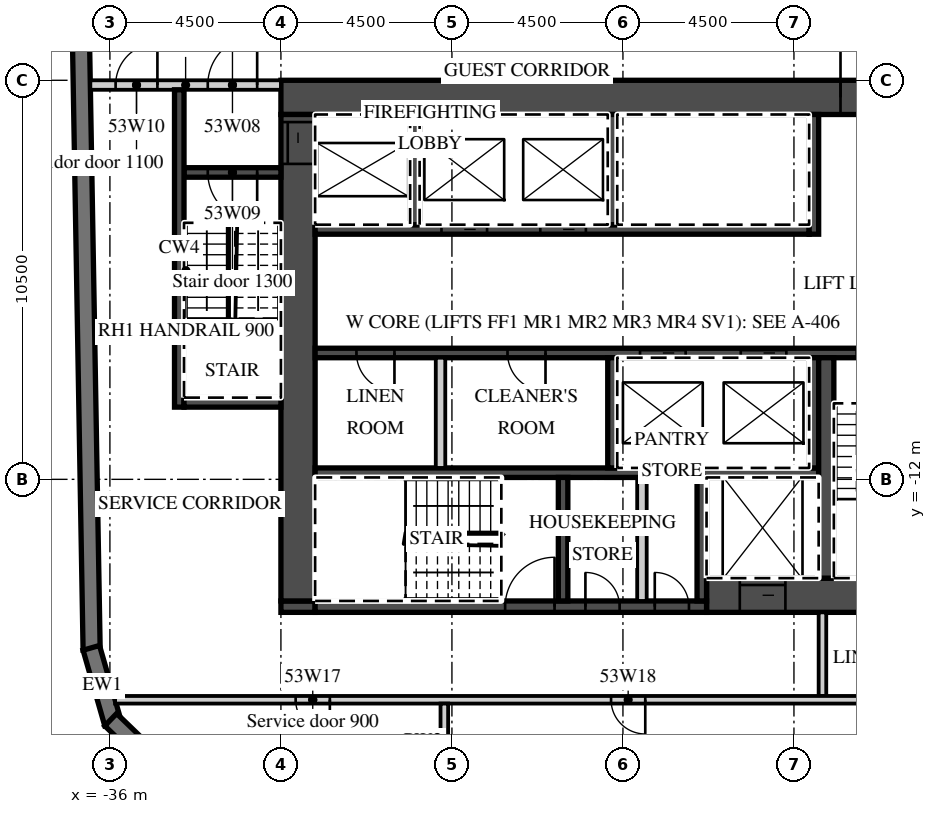
"""IFC4 building model, lengths in metres.
Left out: names, types, materials, properties, quantities, classifications, styles, units other than length and angle.
Written with IfcOpenShell. Run it as: python <this file> out.ifc"""

import sys

from ifc_helpers import new_model, si_unit, direction, frame, frame_2d, origin, place, context, subcontext, project, spatial, polyline, rectangle, outline, extrude, element, fill, save


model = new_model("IFC4")
c1 = context("Model", 3, precision=1e-05, world=origin(), true_north=direction((0.0, 1.0)))
c2 = subcontext(c1, "Body", "Model", "MODEL_VIEW")
j1 = project(units=[si_unit("LENGTHUNIT", "METRE"), si_unit("PLANEANGLEUNIT", "RADIAN")], contexts=[c1])
p1 = place(None, origin())
s1 = spatial("IfcSite", under=j1, at=p1, CompositionType="ELEMENT")
p2 = place(p1, origin())
s2 = spatial("IfcBuilding", under=s1, at=p2, CompositionType="ELEMENT")
p3 = place(p2, frame((0.0, 0.0, 221.0)))
s3 = spatial("IfcBuildingStorey", under=s2, at=p3, CompositionType="ELEMENT", Elevation=221.0)
p4 = place(p3, frame((-37.057, 16.503, 0.0), z_axis=(0.0, 0.0, 1.0), x_axis=(0.017452279857, -0.999847697366, 0.0)))
e1 = element("IfcWall", 1, at=p4, inside=s3, PredefinedType="SOLIDWALL", context=c2, shape_type="SweptSolid", body=[
    extrude(rectangle(XDim=33.0, YDim=0.45, at=frame_2d((16.5, 0.0))), origin(), (0.0, 0.0, 1.0), 3.02),
])
p5 = place(p3, frame((-36.49, -16.434, 0.0), z_axis=(0.0, 0.0, 1.0), x_axis=(0.275577603096, -0.961278827745, 0.0)))
e2 = element("IfcWall", 2, at=p5, inside=s3, PredefinedType="SOLIDWALL", context=c2, shape_type="SweptSolid", body=[
    extrude(outline(polyline([(0.0, -0.225), (2.071, -0.225), (1.95, 0.225), (0.121, 0.225), (0.0, -0.225)])), origin(), (0.0, 0.0, 1.0), 3.02),
])
p6 = place(p3, frame((-35.979, -18.324, 0.0), z_axis=(0.0, 0.0, 1.0), x_axis=(0.719320193998, -0.694678672846, 0.0)))
e3 = element("IfcWall", 3, at=p6, inside=s3, PredefinedType="SOLIDWALL", context=c2, shape_type="SweptSolid", body=[
    extrude(outline(polyline([(0.0, -0.225), (2.071, -0.225), (1.95, 0.225), (0.121, 0.225), (0.0, -0.225)])), origin(), (0.0, 0.0, 1.0), 3.02),
])
p7 = place(p3, frame((-31.5, -1.95, 0.0), z_axis=(0.0, 0.0, 1.0), x_axis=(1.0, 0.0, 0.0)))
e4 = element("IfcWall", 4, at=p7, inside=s3, PredefinedType="SHEAR", context=c2, shape_type="SweptSolid", body=[
    extrude(rectangle(XDim=18.0, YDim=0.9, at=frame_2d((9.0, 0.0))), origin(), (0.0, 0.0, 1.0), 3.02),
])
p8 = place(p7, frame((14.725, 0.0, 0.0)))
e5 = element("IfcOpeningElement", 5, at=p8, cuts=e4, PredefinedType="OPENING", context=c2, shape_type="SweptSolid", body=[
    extrude(rectangle(XDim=1.8, YDim=2.1, at=frame_2d((0.9, 1.05))), frame((0.0, 0.46, 0.0), z_axis=(0.0, -1.0, 0.0), x_axis=(1.0, 0.0, 0.0)), (0.0, 0.0, 1.0), 0.92),
])
p9 = place(p3, frame((-20.3, -15.05, 0.0), z_axis=(0.0, 0.0, 1.0), x_axis=(1.0, 0.0, 0.0)))
e6 = element("IfcWall", 6, at=p9, inside=s3, PredefinedType="SHEAR", context=c2, shape_type="SweptSolid", body=[
    extrude(rectangle(XDim=6.8, YDim=0.9, at=frame_2d((3.4, 0.0))), origin(), (0.0, 0.0, 1.0), 3.02),
])
p10 = place(p9, frame((0.875, 0.0, 0.0)))
e7 = element("IfcOpeningElement", 7, at=p10, cuts=e6, PredefinedType="OPENING", context=c2, shape_type="SweptSolid", body=[
    extrude(rectangle(XDim=1.2, YDim=2.1, at=frame_2d((0.6, 1.05))), frame((0.0, 0.46, 0.0), z_axis=(0.0, -1.0, 0.0), x_axis=(1.0, 0.0, 0.0)), (0.0, 0.0, 1.0), 0.92),
])
p11 = place(p3, frame((-31.5, -15.35, 0.0), z_axis=(0.0, 0.0, 1.0), x_axis=(1.0, 0.0, 0.0)))
e8 = element("IfcWall", 8, at=p11, inside=s3, PredefinedType="SHEAR", context=c2, shape_type="SweptSolid", body=[
    extrude(rectangle(XDim=0.9, YDim=0.3, at=frame_2d((0.45, 0.0))), origin(), (0.0, 0.0, 1.0), 3.02),
])
p12 = place(p3, frame((-30.6, -15.35, 0.0), z_axis=(0.0, 0.0, 1.0), x_axis=(1.0, 0.0, 0.0)))
e9 = element("IfcWall", 9, at=p12, inside=s3, PredefinedType="SHEAR", context=c2, shape_type="SweptSolid", body=[
    extrude(rectangle(XDim=10.3, YDim=0.3, at=frame_2d((5.15, 0.0))), origin(), (0.0, 0.0, 1.0), 3.02),
])
p13 = place(p12, frame((5.0, 0.0, 0.0)))
e10 = element("IfcOpeningElement", 10, at=p13, cuts=e9, PredefinedType="OPENING", context=c2, shape_type="SweptSolid", body=[
    extrude(rectangle(XDim=1.3, YDim=2.1, at=frame_2d((0.65, 1.05))), frame((0.0, 0.16, 0.0), z_axis=(0.0, -1.0, 0.0), x_axis=(1.0, 0.0, 0.0)), (0.0, 0.0, 1.0), 0.32),
])
p14 = place(p12, frame((7.113, 0.0, 0.0)))
e11 = element("IfcOpeningElement", 11, at=p14, cuts=e9, PredefinedType="OPENING", context=c2, shape_type="SweptSolid", body=[
    extrude(rectangle(XDim=0.9, YDim=2.1, at=frame_2d((0.45, 1.05))), frame((0.0, 0.16, 0.0), z_axis=(0.0, -1.0, 0.0), x_axis=(1.0, 0.0, 0.0)), (0.0, 0.0, 1.0), 0.32),
])
p15 = place(p12, frame((8.938, 0.0, 0.0)))
e12 = element("IfcOpeningElement", 12, at=p15, cuts=e9, PredefinedType="OPENING", context=c2, shape_type="SweptSolid", body=[
    extrude(rectangle(XDim=0.9, YDim=2.1, at=frame_2d((0.45, 1.05))), frame((0.0, 0.16, 0.0), z_axis=(0.0, -1.0, 0.0), x_axis=(1.0, 0.0, 0.0)), (0.0, 0.0, 1.0), 0.32),
])
p16 = place(p3, frame((-31.05, -15.2, 0.0), z_axis=(0.0, 0.0, 1.0), x_axis=(0.0, 1.0, 0.0)))
e13 = element("IfcWall", 13, at=p16, inside=s3, PredefinedType="SHEAR", context=c2, shape_type="SweptSolid", body=[
    extrude(rectangle(XDim=12.8, YDim=0.9, at=frame_2d((6.4, 0.0))), origin(), (0.0, 0.0, 1.0), 3.02),
])
p17 = place(p16, frame((11.5, 0.0, 0.0)))
e14 = element("IfcOpeningElement", 14, at=p17, cuts=e13, PredefinedType="OPENING", context=c2, shape_type="SweptSolid", body=[
    extrude(rectangle(XDim=1.1, YDim=2.1, at=frame_2d((0.55, 1.05))), frame((0.0, 0.46, 0.0), z_axis=(0.0, -1.0, 0.0), x_axis=(1.0, 0.0, 0.0)), (0.0, 0.0, 1.0), 0.92),
])
p18 = place(p3, frame((-30.6, -5.425, 0.0), z_axis=(0.0, 0.0, 1.0), x_axis=(1.0, 0.0, 0.0)))
e15 = element("IfcWall", 15, at=p18, inside=s3, PredefinedType="SHEAR", context=c2, shape_type="SweptSolid", body=[
    extrude(rectangle(XDim=13.0, YDim=0.25, at=frame_2d((6.5, 0.0))), origin(), (0.0, 0.0, 1.0), 3.02),
])
p19 = place(p18, frame((3.325, 0.0, 0.0)))
e16 = element("IfcOpeningElement", 16, at=p19, cuts=e15, PredefinedType="OPENING", context=c2, shape_type="SweptSolid", body=[
    extrude(rectangle(XDim=1.2, YDim=2.1, at=frame_2d((0.6, 1.05))), frame((0.0, 0.135, 0.0), z_axis=(0.0, -1.0, 0.0), x_axis=(1.0, 0.0, 0.0)), (0.0, 0.0, 1.0), 0.27),
])
p20 = place(p18, frame((5.925, 0.0, 0.0)))
e17 = element("IfcOpeningElement", 17, at=p20, cuts=e15, PredefinedType="OPENING", context=c2, shape_type="SweptSolid", body=[
    extrude(rectangle(XDim=1.2, YDim=2.1, at=frame_2d((0.6, 1.05))), frame((0.0, 0.135, 0.0), z_axis=(0.0, -1.0, 0.0), x_axis=(1.0, 0.0, 0.0)), (0.0, 0.0, 1.0), 0.27),
])
p21 = place(p3, frame((-17.475, -5.55, 0.0), z_axis=(0.0, 0.0, 1.0), x_axis=(0.0, 1.0, 0.0)))
e18 = element("IfcWall", 18, at=p21, inside=s3, PredefinedType="SHEAR", context=c2, shape_type="SweptSolid", body=[
    extrude(rectangle(XDim=3.15, YDim=0.25, at=frame_2d((1.575, 0.0))), origin(), (0.0, 0.0, 1.0), 3.02),
])
for number, where, z_axis, x_axis in (
    (19, (-27.975, -5.3, 0.0), (0.0, 0.0, 1.0), (0.0, 1.0, 0.0)),
    (20, (-22.775, -5.3, 0.0), (0.0, 0.0, 1.0), (0.0, 1.0, 0.0)),
):
    element("IfcWall", number, at=place(p3, frame(where, z_axis=z_axis, x_axis=x_axis)), inside=s3, PredefinedType="SHEAR", context=c2, shape_type="SweptSolid", body=[
        extrude(rectangle(XDim=2.9, YDim=0.25, at=frame_2d((1.45, 0.0))), origin(), (0.0, 0.0, 1.0), 3.02),
    ])
p22 = place(p3, frame((-30.6, -8.675, 0.0), z_axis=(0.0, 0.0, 1.0), x_axis=(1.0, 0.0, 0.0)))
e21 = element("IfcWall", 21, at=p22, inside=s3, PredefinedType="SHEAR", context=c2, shape_type="SweptSolid", body=[
    extrude(rectangle(XDim=16.2, YDim=0.25, at=frame_2d((8.1, 0.0))), origin(), (0.0, 0.0, 1.0), 3.02),
])
p23 = place(p22, frame((8.55, 0.0, 0.0)))
e22 = element("IfcOpeningElement", 22, at=p23, cuts=e21, PredefinedType="OPENING", context=c2, shape_type="SweptSolid", body=[
    extrude(rectangle(XDim=1.2, YDim=2.1, at=frame_2d((0.6, 1.05))), frame((0.0, 0.135, 0.0), z_axis=(0.0, -1.0, 0.0), x_axis=(1.0, 0.0, 0.0)), (0.0, 0.0, 1.0), 0.27),
])
p24 = place(p22, frame((11.2, 0.0, 0.0)))
e23 = element("IfcOpeningElement", 23, at=p24, cuts=e21, PredefinedType="OPENING", context=c2, shape_type="SweptSolid", body=[
    extrude(rectangle(XDim=1.2, YDim=2.1, at=frame_2d((0.6, 1.05))), frame((0.0, 0.135, 0.0), z_axis=(0.0, -1.0, 0.0), x_axis=(1.0, 0.0, 0.0)), (0.0, 0.0, 1.0), 0.27),
])
p25 = place(p22, frame((14.25, 0.0, 0.0)))
e24 = element("IfcOpeningElement", 24, at=p25, cuts=e21, PredefinedType="OPENING", context=c2, shape_type="SweptSolid", body=[
    extrude(rectangle(XDim=1.3, YDim=2.1, at=frame_2d((0.65, 1.05))), frame((0.0, 0.135, 0.0), z_axis=(0.0, -1.0, 0.0), x_axis=(1.0, 0.0, 0.0)), (0.0, 0.0, 1.0), 0.27),
])
p26 = place(p22, frame((1.087, 0.0, 0.0)))
e25 = element("IfcOpeningElement", 25, at=p26, cuts=e21, PredefinedType="OPENING", context=c2, shape_type="SweptSolid", body=[
    extrude(rectangle(XDim=1.0, YDim=2.1, at=frame_2d((0.5, 1.05))), frame((0.0, 0.135, 0.0), z_axis=(0.0, -1.0, 0.0), x_axis=(1.0, 0.0, 0.0)), (0.0, 0.0, 1.0), 0.27),
])
p27 = place(p22, frame((5.062, 0.0, 0.0)))
e26 = element("IfcOpeningElement", 26, at=p27, cuts=e21, PredefinedType="OPENING", context=c2, shape_type="SweptSolid", body=[
    extrude(rectangle(XDim=1.0, YDim=2.1, at=frame_2d((0.5, 1.05))), frame((0.0, 0.135, 0.0), z_axis=(0.0, -1.0, 0.0), x_axis=(1.0, 0.0, 0.0)), (0.0, 0.0, 1.0), 0.27),
])
p28 = place(p3, frame((-30.6, -11.825, 0.0), z_axis=(0.0, 0.0, 1.0), x_axis=(1.0, 0.0, 0.0)))
e27 = element("IfcWall", 27, at=p28, inside=s3, PredefinedType="SHEAR", context=c2, shape_type="SweptSolid", body=[
    extrude(rectangle(XDim=13.25, YDim=0.25, at=frame_2d((6.625, 0.0))), origin(), (0.0, 0.0, 1.0), 3.02),
])
for number, where, z_axis, x_axis in (
    (28, (-17.475, -11.7, 0.0), (0.0, 0.0, 1.0), (0.0, 1.0, 0.0)),
    (29, (-22.775, -11.7, 0.0), (0.0, 0.0, 1.0), (0.0, 1.0, 0.0)),
):
    element("IfcWall", number, at=place(p3, frame(where, z_axis=z_axis, x_axis=x_axis)), inside=s3, PredefinedType="SHEAR", context=c2, shape_type="SweptSolid", body=[
        extrude(rectangle(XDim=2.9, YDim=0.25, at=frame_2d((1.45, 0.0))), origin(), (0.0, 0.0, 1.0), 3.02),
    ])
p29 = place(p3, frame((-27.3, -11.7, 0.0), z_axis=(0.0, 0.0, 1.0), x_axis=(0.0, 1.0, 0.0)))
e30 = element("IfcWall", 30, at=p29, inside=s3, PredefinedType="PARTITIONING", context=c2, shape_type="SweptSolid", body=[
    extrude(rectangle(XDim=2.9, YDim=0.25, at=frame_2d((1.45, 0.0))), origin(), (0.0, 0.0, 1.0), 3.02),
])
p30 = place(p3, frame((-17.15, -14.6, 0.0), z_axis=(0.0, 0.0, 1.0), x_axis=(0.0, 1.0, 0.0)))
e31 = element("IfcWall", 31, at=p30, inside=s3, PredefinedType="SHEAR", context=c2, shape_type="SweptSolid", body=[
    extrude(rectangle(XDim=5.8, YDim=0.4, at=frame_2d((2.9, 0.0))), origin(), (0.0, 0.0, 1.0), 3.02),
])
for number, where, z_axis, x_axis in (
    (32, (-20.425, -15.2, 0.0), (0.0, 0.0, 1.0), (0.0, 1.0, 0.0)),
    (33, (-24.075, -15.2, 0.0), (0.0, 0.0, 1.0), (0.0, 1.0, 0.0)),
):
    element("IfcWall", number, at=place(p3, frame(where, z_axis=z_axis, x_axis=x_axis)), inside=s3, PredefinedType="SHEAR", context=c2, shape_type="SweptSolid", body=[
        extrude(rectangle(XDim=3.25, YDim=0.25, at=frame_2d((1.625, 0.0))), origin(), (0.0, 0.0, 1.0), 3.02),
    ])
p31 = place(p3, frame((-22.0, -15.2, 0.0), z_axis=(0.0, 0.0, 1.0), x_axis=(0.0, 1.0, 0.0)))
e34 = element("IfcWall", 34, at=p31, inside=s3, PredefinedType="PARTITIONING", context=c2, shape_type="SweptSolid", body=[
    extrude(rectangle(XDim=3.25, YDim=0.25, at=frame_2d((1.625, 0.0))), origin(), (0.0, 0.0, 1.0), 3.02),
])
p32 = place(p3, frame((-36.515, -1.625, 0.0), z_axis=(0.0, 0.0, 1.0), x_axis=(1.0, 0.0, 0.0)))
e35 = element("IfcWall", 35, at=p32, inside=s3, PredefinedType="PARTITIONING", context=c2, shape_type="SweptSolid", body=[
    extrude(rectangle(XDim=5.015, YDim=0.25, at=frame_2d((2.508, 0.0))), origin(), (0.0, 0.0, 1.0), 3.02),
])
p33 = place(p32, frame((3.09, 0.0, 0.0)))
e36 = element("IfcOpeningElement", 36, at=p33, cuts=e35, PredefinedType="OPENING", context=c2, shape_type="SweptSolid", body=[
    extrude(rectangle(XDim=1.3, YDim=2.1, at=frame_2d((0.65, 1.05))), frame((0.0, 0.135, 0.0), z_axis=(0.0, -1.0, 0.0), x_axis=(1.0, 0.0, 0.0)), (0.0, 0.0, 1.0), 0.27),
])
p34 = place(p32, frame((0.665, 0.0, 0.0)))
e37 = element("IfcOpeningElement", 37, at=p34, cuts=e35, PredefinedType="OPENING", context=c2, shape_type="SweptSolid", body=[
    extrude(rectangle(XDim=1.1, YDim=2.1, at=frame_2d((0.55, 1.05))), frame((0.0, 0.135, 0.0), z_axis=(0.0, -1.0, 0.0), x_axis=(1.0, 0.0, 0.0)), (0.0, 0.0, 1.0), 0.27),
])
p35 = place(p3, frame((-34.05, -3.925, 0.0), z_axis=(0.0, 0.0, 1.0), x_axis=(1.0, 0.0, 0.0)))
e38 = element("IfcWall", 38, at=p35, inside=s3, PredefinedType="SHEAR", context=c2, shape_type="SweptSolid", body=[
    extrude(rectangle(XDim=2.55, YDim=0.25, at=frame_2d((1.275, 0.0))), origin(), (0.0, 0.0, 1.0), 3.02),
])
p36 = place(p35, frame((0.625, 0.0, 0.0)))
e39 = element("IfcOpeningElement", 39, at=p36, cuts=e38, PredefinedType="OPENING", context=c2, shape_type="SweptSolid", body=[
    extrude(rectangle(XDim=1.3, YDim=2.1, at=frame_2d((0.65, 1.05))), frame((0.0, 0.135, 0.0), z_axis=(0.0, -1.0, 0.0), x_axis=(1.0, 0.0, 0.0)), (0.0, 0.0, 1.0), 0.27),
])
p37 = place(p3, frame((-34.175, -10.1, 0.0), z_axis=(0.0, 0.0, 1.0), x_axis=(0.0, 1.0, 0.0)))
e40 = element("IfcWall", 40, at=p37, inside=s3, PredefinedType="SHEAR", context=c2, shape_type="SweptSolid", body=[
    extrude(rectangle(XDim=8.35, YDim=0.25, at=frame_2d((4.175, 0.0))), origin(), (0.0, 0.0, 1.0), 3.02),
])
p38 = place(p3, frame((-34.05, -9.975, 0.0), z_axis=(0.0, 0.0, 1.0), x_axis=(1.0, 0.0, 0.0)))
e41 = element("IfcWall", 41, at=p38, inside=s3, PredefinedType="SHEAR", context=c2, shape_type="SweptSolid", body=[
    extrude(rectangle(XDim=2.55, YDim=0.25, at=frame_2d((1.275, 0.0))), origin(), (0.0, 0.0, 1.0), 3.02),
])
p39 = place(p3, frame((-17.25, -17.7, 0.0), z_axis=(0.0, 0.0, 1.0), x_axis=(0.0, 1.0, 0.0)))
e42 = element("IfcWall", 42, at=p39, inside=s3, PredefinedType="PARTITIONING", context=c2, shape_type="SweptSolid", body=[
    extrude(rectangle(XDim=2.2, YDim=0.2, at=frame_2d((1.1, 0.0))), origin(), (0.0, 0.0, 1.0), 3.02),
])
p40 = place(p3, frame((-35.864, -17.8, 0.0), z_axis=(0.0, 0.0, 1.0), x_axis=(1.0, 0.0, 0.0)))
e43 = element("IfcWall", 43, at=p40, inside=s3, PredefinedType="PARTITIONING", context=c2, shape_type="SweptSolid", body=[
    extrude(rectangle(XDim=22.264, YDim=0.2, at=frame_2d((11.132, 0.0))), origin(), (0.0, 0.0, 1.0), 3.02),
])
p41 = place(p40, frame((4.751, 0.0, 0.0)))
e44 = element("IfcOpeningElement", 44, at=p41, cuts=e43, PredefinedType="OPENING", context=c2, shape_type="SweptSolid", body=[
    extrude(rectangle(XDim=0.9, YDim=2.1, at=frame_2d((0.45, 1.05))), frame((0.0, 0.11, 0.0), z_axis=(0.0, -1.0, 0.0), x_axis=(1.0, 0.0, 0.0)), (0.0, 0.0, 1.0), 0.22),
])
p42 = place(p40, frame((13.051, 0.0, 0.0)))
e45 = element("IfcOpeningElement", 45, at=p42, cuts=e43, PredefinedType="OPENING", context=c2, shape_type="SweptSolid", body=[
    extrude(rectangle(XDim=0.9, YDim=2.1, at=frame_2d((0.45, 1.05))), frame((0.0, 0.11, 0.0), z_axis=(0.0, -1.0, 0.0), x_axis=(1.0, 0.0, 0.0)), (0.0, 0.0, 1.0), 0.22),
])
p43 = place(p3, frame((-27.2, -19.88, 0.0), z_axis=(0.0, 0.0, 1.0), x_axis=(0.0, 1.0, 0.0)))
e46 = element("IfcWall", 46, at=p43, inside=s3, PredefinedType="PARTITIONING", context=c2, shape_type="SweptSolid", body=[
    extrude(rectangle(XDim=1.98, YDim=0.2, at=frame_2d((0.99, 0.0))), origin(), (0.0, 0.0, 1.0), 3.02),
])
p44 = place(p23, origin())
e47 = element("IfcDoor", 47, at=p44, inside=s3, OperationType="SLIDING_TO_LEFT", PredefinedType="DOOR", context=c2, shape_type="SweptSolid", body=[
    extrude(rectangle(XDim=1.2, YDim=2.1, at=frame_2d((0.6, 1.05))), frame((0.0, 0.025, 0.0), z_axis=(0.0, -1.0, 0.0), x_axis=(1.0, 0.0, 0.0)), (0.0, 0.0, 1.0), 0.05),
])
fill(e22, e47)
p45 = place(p24, origin())
e48 = element("IfcDoor", 48, at=p45, inside=s3, OperationType="SLIDING_TO_RIGHT", PredefinedType="DOOR", context=c2, shape_type="SweptSolid", body=[
    extrude(rectangle(XDim=1.2, YDim=2.1, at=frame_2d((0.6, 1.05))), frame((0.0, 0.025, 0.0), z_axis=(0.0, -1.0, 0.0), x_axis=(1.0, 0.0, 0.0)), (0.0, 0.0, 1.0), 0.05),
])
fill(e23, e48)
p46 = place(p19, origin())
e49 = element("IfcDoor", 49, at=p46, inside=s3, OperationType="SLIDING_TO_RIGHT", PredefinedType="DOOR", context=c2, shape_type="SweptSolid", body=[
    extrude(rectangle(XDim=1.2, YDim=2.1, at=frame_2d((0.6, 1.05))), frame((0.0, 0.025, 0.0), z_axis=(0.0, -1.0, 0.0), x_axis=(1.0, 0.0, 0.0)), (0.0, 0.0, 1.0), 0.05),
])
fill(e16, e49)
p47 = place(p20, origin())
e50 = element("IfcDoor", 50, at=p47, inside=s3, OperationType="SLIDING_TO_RIGHT", PredefinedType="DOOR", context=c2, shape_type="SweptSolid", body=[
    extrude(rectangle(XDim=1.2, YDim=2.1, at=frame_2d((0.6, 1.05))), frame((0.0, 0.025, 0.0), z_axis=(0.0, -1.0, 0.0), x_axis=(1.0, 0.0, 0.0)), (0.0, 0.0, 1.0), 0.05),
])
fill(e17, e50)
p48 = place(p10, origin())
e51 = element("IfcDoor", 51, at=p48, inside=s3, OperationType="SLIDING_TO_LEFT", PredefinedType="DOOR", context=c2, shape_type="SweptSolid", body=[
    extrude(rectangle(XDim=1.2, YDim=2.1, at=frame_2d((0.6, 1.05))), frame((0.0, 0.025, 0.0), z_axis=(0.0, -1.0, 0.0), x_axis=(1.0, 0.0, 0.0)), (0.0, 0.0, 1.0), 0.05),
])
fill(e7, e51)
p49 = place(p17, origin())
e52 = element("IfcDoor", 52, at=p49, inside=s3, OperationType="SLIDING_TO_RIGHT", PredefinedType="DOOR", context=c2, shape_type="SweptSolid", body=[
    extrude(rectangle(XDim=1.1, YDim=2.1, at=frame_2d((0.55, 1.05))), frame((0.0, 0.025, 0.0), z_axis=(0.0, -1.0, 0.0), x_axis=(1.0, 0.0, 0.0)), (0.0, 0.0, 1.0), 0.05),
])
fill(e14, e52)
p50 = place(p8, origin())
e53 = element("IfcDoor", 53, at=p50, inside=s3, OperationType="DOUBLE_DOOR_DOUBLE_SWING", PredefinedType="DOOR", context=c2, shape_type="SweptSolid", body=[
    extrude(rectangle(XDim=1.8, YDim=2.1, at=frame_2d((0.9, 1.05))), frame((0.0, 0.025, 0.0), z_axis=(0.0, -1.0, 0.0), x_axis=(1.0, 0.0, 0.0)), (0.0, 0.0, 1.0), 0.05),
])
fill(e5, e53)
p51 = place(p33, origin())
e54 = element("IfcDoor", 54, at=p51, inside=s3, OperationType="SINGLE_SWING_RIGHT", PredefinedType="DOOR", context=c2, shape_type="SweptSolid", body=[
    extrude(rectangle(XDim=1.3, YDim=2.1, at=frame_2d((0.65, 1.05))), frame((0.0, 0.025, 0.0), z_axis=(0.0, -1.0, 0.0), x_axis=(1.0, 0.0, 0.0)), (0.0, 0.0, 1.0), 0.05),
])
fill(e36, e54)
p52 = place(p36, origin())
e55 = element("IfcDoor", 55, at=p52, inside=s3, OperationType="SINGLE_SWING_RIGHT", PredefinedType="DOOR", context=c2, shape_type="SweptSolid", body=[
    extrude(rectangle(XDim=1.3, YDim=2.1, at=frame_2d((0.65, 1.05))), frame((0.0, 0.025, 0.0), z_axis=(0.0, -1.0, 0.0), x_axis=(1.0, 0.0, 0.0)), (0.0, 0.0, 1.0), 0.05),
])
fill(e39, e55)
p53 = place(p34, origin())
e56 = element("IfcDoor", 56, at=p53, inside=s3, OperationType="SINGLE_SWING_RIGHT", PredefinedType="DOOR", context=c2, shape_type="SweptSolid", body=[
    extrude(rectangle(XDim=1.1, YDim=2.1, at=frame_2d((0.55, 1.05))), frame((0.0, 0.025, 0.0), z_axis=(0.0, -1.0, 0.0), x_axis=(1.0, 0.0, 0.0)), (0.0, 0.0, 1.0), 0.05),
])
fill(e37, e56)
p54 = place(p25, origin())
e57 = element("IfcDoor", 57, at=p54, inside=s3, OperationType="SINGLE_SWING_RIGHT", PredefinedType="DOOR", context=c2, shape_type="SweptSolid", body=[
    extrude(rectangle(XDim=1.3, YDim=2.1, at=frame_2d((0.65, 1.05))), frame((0.0, 0.025, 0.0), z_axis=(0.0, -1.0, 0.0), x_axis=(1.0, 0.0, 0.0)), (0.0, 0.0, 1.0), 0.05),
])
fill(e24, e57)
p55 = place(p13, origin())
e58 = element("IfcDoor", 58, at=p55, inside=s3, OperationType="SINGLE_SWING_RIGHT", PredefinedType="DOOR", context=c2, shape_type="SweptSolid", body=[
    extrude(rectangle(XDim=1.3, YDim=2.1, at=frame_2d((0.65, 1.05))), frame((0.0, 0.025, 0.0), z_axis=(0.0, -1.0, 0.0), x_axis=(1.0, 0.0, 0.0)), (0.0, 0.0, 1.0), 0.05),
])
fill(e10, e58)
p56 = place(p14, origin())
e59 = element("IfcDoor", 59, at=p56, inside=s3, OperationType="SINGLE_SWING_LEFT", PredefinedType="DOOR", context=c2, shape_type="SweptSolid", body=[
    extrude(rectangle(XDim=0.9, YDim=2.1, at=frame_2d((0.45, 1.05))), frame((0.0, 0.025, 0.0), z_axis=(0.0, -1.0, 0.0), x_axis=(1.0, 0.0, 0.0)), (0.0, 0.0, 1.0), 0.05),
])
fill(e11, e59)
p57 = place(p15, origin())
e60 = element("IfcDoor", 60, at=p57, inside=s3, OperationType="SINGLE_SWING_LEFT", PredefinedType="DOOR", context=c2, shape_type="SweptSolid", body=[
    extrude(rectangle(XDim=0.9, YDim=2.1, at=frame_2d((0.45, 1.05))), frame((0.0, 0.025, 0.0), z_axis=(0.0, -1.0, 0.0), x_axis=(1.0, 0.0, 0.0)), (0.0, 0.0, 1.0), 0.05),
])
fill(e12, e60)
p58 = place(p26, origin())
e61 = element("IfcDoor", 61, at=p58, inside=s3, OperationType="SINGLE_SWING_RIGHT", PredefinedType="DOOR", context=c2, shape_type="SweptSolid", body=[
    extrude(rectangle(XDim=1.0, YDim=2.1, at=frame_2d((0.5, 1.05))), frame((0.0, 0.025, 0.0), z_axis=(0.0, -1.0, 0.0), x_axis=(1.0, 0.0, 0.0)), (0.0, 0.0, 1.0), 0.05),
])
fill(e25, e61)
p59 = place(p27, origin())
e62 = element("IfcDoor", 62, at=p59, inside=s3, OperationType="SINGLE_SWING_RIGHT", PredefinedType="DOOR", context=c2, shape_type="SweptSolid", body=[
    extrude(rectangle(XDim=1.0, YDim=2.1, at=frame_2d((0.5, 1.05))), frame((0.0, 0.025, 0.0), z_axis=(0.0, -1.0, 0.0), x_axis=(1.0, 0.0, 0.0)), (0.0, 0.0, 1.0), 0.05),
])
fill(e26, e62)
p60 = place(p41, origin())
e63 = element("IfcDoor", 63, at=p60, inside=s3, OperationType="SINGLE_SWING_RIGHT", PredefinedType="DOOR", context=c2, shape_type="SweptSolid", body=[
    extrude(rectangle(XDim=0.9, YDim=2.1, at=frame_2d((0.45, 1.05))), frame((0.0, 0.025, 0.0), z_axis=(0.0, -1.0, 0.0), x_axis=(1.0, 0.0, 0.0)), (0.0, 0.0, 1.0), 0.05),
])
fill(e44, e63)
p61 = place(p42, origin())
e64 = element("IfcDoor", 64, at=p61, inside=s3, OperationType="SINGLE_SWING_RIGHT", PredefinedType="DOOR", context=c2, shape_type="SweptSolid", body=[
    extrude(rectangle(XDim=0.9, YDim=2.1, at=frame_2d((0.45, 1.05))), frame((0.0, 0.025, 0.0), z_axis=(0.0, -1.0, 0.0), x_axis=(1.0, 0.0, 0.0)), (0.0, 0.0, 1.0), 0.05),
])
fill(e45, e64)
save(model, sys.argv[1])
